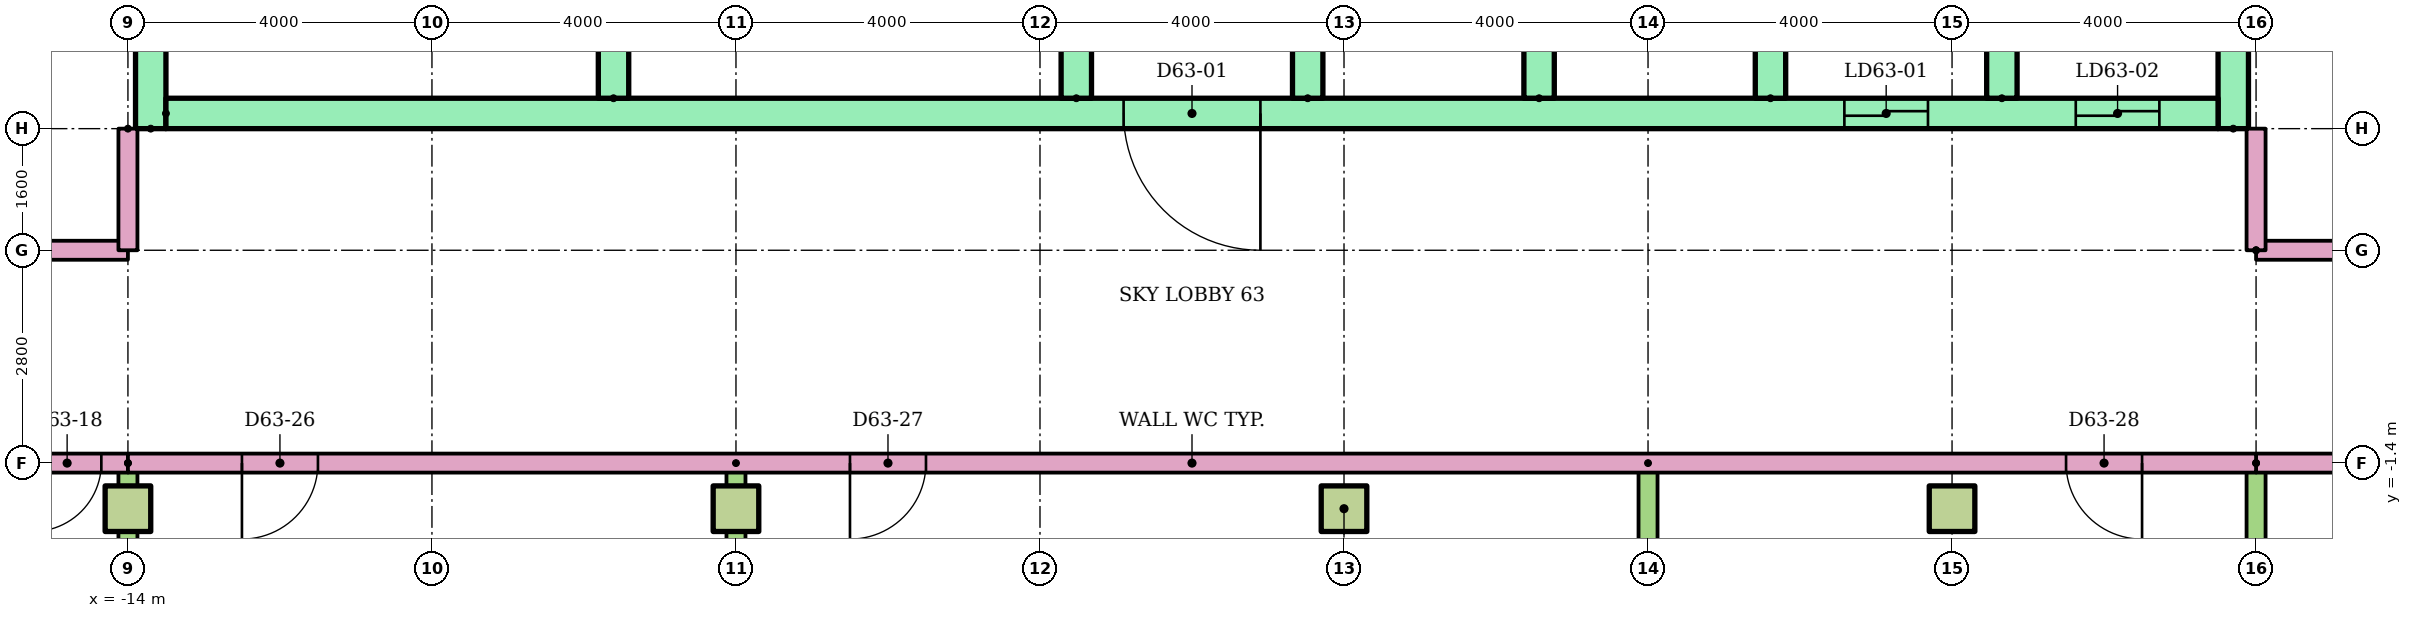
"""IFC4 building model, lengths in metres.
Left out: names, types, materials, properties, quantities, classifications, styles, units other than length and angle.
Written with IfcOpenShell. Run it as: python <this file> out.ifc"""

import sys

from ifc_helpers import new_model, si_unit, direction, frame, frame_2d, origin, origin_2d, place, context, subcontext, project, spatial, rectangle, extrude, element, fill, save


model = new_model("IFC4")
c1 = context("Model", 3, precision=1e-05, world=origin(), true_north=direction((0.0, 1.0)))
c2 = subcontext(c1, "Body", "Model", "MODEL_VIEW")
j1 = project(units=[si_unit("LENGTHUNIT", "METRE"), si_unit("PLANEANGLEUNIT", "RADIAN")], contexts=[c1])
p1 = place(None, origin())
s1 = spatial("IfcSite", under=j1, at=p1, CompositionType="ELEMENT")
p2 = place(p1, origin())
s2 = spatial("IfcBuilding", under=s1, at=p2, CompositionType="ELEMENT")
p3 = place(p2, frame((0.0, 0.0, 239.6)))
s3 = spatial("IfcBuildingStorey", under=s2, at=p3, CompositionType="ELEMENT", Elevation=239.6)
for number, where in (
    (1, (-14.0, -2.0, 0.0)),
    (2, (-6.0, -2.0, 0.0)),
    (3, (2.0, -2.0, 0.0)),
    (4, (10.0, -2.0, 0.0)),
):
    element("IfcColumn", number, at=place(p3, frame(where)), inside=s3, PredefinedType="COLUMN", context=c2, shape_type="SweptSolid", body=[
        extrude(rectangle(XDim=0.6, YDim=0.6, at=origin_2d()), origin(), (0.0, 0.0, 1.0), 8.8),
    ])
for number, where, z_axis, x_axis in (
    (5, (-13.7, 3.0, 0.0), (0.0, 0.0, 1.0), (0.0, 1.0, 0.0)),
    (6, (13.7, 3.0, 0.0), (0.0, 0.0, 1.0), (0.0, 1.0, 0.0)),
):
    element("IfcWall", number, at=place(p3, frame(where, z_axis=z_axis, x_axis=x_axis)), inside=s3, PredefinedType="SHEAR", context=c2, shape_type="SweptSolid", body=[
        extrude(rectangle(XDim=17.0, YDim=0.4, at=frame_2d((8.5, 0.0))), origin(), (0.0, 0.0, 1.0), 8.8),
    ])
p4 = place(p3, frame((-13.5, 3.2, 0.0)))
e7 = element("IfcWall", 7, at=p4, inside=s3, PredefinedType="SHEAR", context=c2, shape_type="SweptSolid", body=[
    extrude(rectangle(XDim=27.0, YDim=0.4, at=frame_2d((13.5, 0.0))), origin(), (0.0, 0.0, 1.0), 8.8),
])
p5 = place(p4, frame((22.083, 0.0, 0.0)))
e8 = element("IfcOpeningElement", 8, at=p5, cuts=e7, PredefinedType="OPENING", context=c2, shape_type="SweptSolid", body=[
    extrude(rectangle(XDim=1.1, YDim=2.1, at=frame_2d((0.55, 1.05))), frame((0.0, 0.21, 0.0), z_axis=(0.0, -1.0, 0.0), x_axis=(1.0, 0.0, 0.0)), (0.0, 0.0, 1.0), 0.42),
])
p6 = place(p4, frame((25.128, 0.0, 0.0)))
e9 = element("IfcOpeningElement", 9, at=p6, cuts=e7, PredefinedType="OPENING", context=c2, shape_type="SweptSolid", body=[
    extrude(rectangle(XDim=1.1, YDim=2.1, at=frame_2d((0.55, 1.05))), frame((0.0, 0.21, 0.0), z_axis=(0.0, -1.0, 0.0), x_axis=(1.0, 0.0, 0.0)), (0.0, 0.0, 1.0), 0.42),
])
p7 = place(p4, frame((12.6, 0.0, 0.0)))
e10 = element("IfcOpeningElement", 10, at=p7, cuts=e7, PredefinedType="OPENING", context=c2, shape_type="SweptSolid", body=[
    extrude(rectangle(XDim=1.8, YDim=2.1, at=frame_2d((0.9, 1.05))), frame((0.0, 0.21, 0.0), z_axis=(0.0, -1.0, 0.0), x_axis=(1.0, 0.0, 0.0)), (0.0, 0.0, 1.0), 0.42),
])
for number, where, z_axis, x_axis in (
    (11, (-7.611, 3.4, 0.0), (0.0, 0.0, 1.0), (0.0, 1.0, 0.0)),
    (12, (-1.522, 3.4, 0.0), (0.0, 0.0, 1.0), (0.0, 1.0, 0.0)),
    (13, (1.522, 3.4, 0.0), (0.0, 0.0, 1.0), (0.0, 1.0, 0.0)),
    (14, (4.567, 3.4, 0.0), (0.0, 0.0, 1.0), (0.0, 1.0, 0.0)),
    (15, (7.611, 3.4, 0.0), (0.0, 0.0, 1.0), (0.0, 1.0, 0.0)),
    (16, (10.656, 3.4, 0.0), (0.0, 0.0, 1.0), (0.0, 1.0, 0.0)),
):
    element("IfcWall", number, at=place(p3, frame(where, z_axis=z_axis, x_axis=x_axis)), inside=s3, PredefinedType="SHEAR", context=c2, shape_type="SweptSolid", body=[
        extrude(rectangle(XDim=3.0, YDim=0.4, at=frame_2d((1.5, 0.0))), origin(), (0.0, 0.0, 1.0), 8.8),
    ])
p8 = place(p3, frame((-14.0, -1.4, 0.0), z_axis=(0.0, 0.0, 1.0), x_axis=(-1.0, 0.0, 0.0)))
e17 = element("IfcWall", 17, at=p8, inside=s3, PredefinedType="PARTITIONING", context=c2, shape_type="SweptSolid", body=[
    extrude(rectangle(XDim=14.93, YDim=0.25, at=frame_2d((7.465, 0.0))), origin(), (0.0, 0.0, 1.0), 8.8),
])
p9 = place(p8, frame((0.35, 0.0, 0.0)))
e18 = element("IfcOpeningElement", 18, at=p9, cuts=e17, PredefinedType="OPENING", context=c2, shape_type="SweptSolid", body=[
    extrude(rectangle(XDim=0.9, YDim=2.1, at=frame_2d((0.45, 1.05))), frame((0.0, 0.135, 0.0), z_axis=(0.0, -1.0, 0.0), x_axis=(1.0, 0.0, 0.0)), (0.0, 0.0, 1.0), 0.27),
])
p10 = place(p8, frame((5.5, 0.0, 0.0)))
e19 = element("IfcOpeningElement", 19, at=p10, cuts=e17, PredefinedType="OPENING", context=c2, shape_type="SweptSolid", body=[
    extrude(rectangle(XDim=1.0, YDim=2.1, at=frame_2d((0.5, 1.05))), frame((0.0, 0.135, 0.0), z_axis=(0.0, -1.0, 0.0), x_axis=(1.0, 0.0, 0.0)), (0.0, 0.0, 1.0), 0.27),
])
p11 = place(p3, frame((-14.0, -1.4, 0.0), z_axis=(0.0, 0.0, 1.0), x_axis=(0.0, -1.0, 0.0)))
e20 = element("IfcWall", 20, at=p11, inside=s3, PredefinedType="PARTITIONING", context=c2, shape_type="SweptSolid", body=[
    extrude(rectangle(XDim=15.121, YDim=0.25, at=frame_2d((7.561, 0.0))), origin(), (0.0, 0.0, 1.0), 8.8),
])
p12 = place(p3, frame((-28.93, 1.4, 0.0)))
e21 = element("IfcWall", 21, at=p12, inside=s3, PredefinedType="PARTITIONING", context=c2, shape_type="SweptSolid", body=[
    extrude(rectangle(XDim=14.93, YDim=0.25, at=frame_2d((7.465, 0.0))), origin(), (0.0, 0.0, 1.0), 8.8),
])
p13 = place(p12, frame((12.43, 0.0, 0.0)))
e22 = element("IfcOpeningElement", 22, at=p13, cuts=e21, PredefinedType="OPENING", context=c2, shape_type="SweptSolid", body=[
    extrude(rectangle(XDim=1.0, YDim=2.1, at=frame_2d((0.5, 1.05))), frame((0.0, 0.135, 0.0), z_axis=(0.0, -1.0, 0.0), x_axis=(1.0, 0.0, 0.0)), (0.0, 0.0, 1.0), 0.27),
])
p14 = place(p12, frame((4.43, 0.0, 0.0)))
e23 = element("IfcOpeningElement", 23, at=p14, cuts=e21, PredefinedType="OPENING", context=c2, shape_type="SweptSolid", body=[
    extrude(rectangle(XDim=1.0, YDim=2.1, at=frame_2d((0.5, 1.05))), frame((0.0, 0.135, 0.0), z_axis=(0.0, -1.0, 0.0), x_axis=(1.0, 0.0, 0.0)), (0.0, 0.0, 1.0), 0.27),
])
p15 = place(p3, frame((28.93, -1.4, 0.0), z_axis=(0.0, 0.0, 1.0), x_axis=(-1.0, 0.0, 0.0)))
e24 = element("IfcWall", 24, at=p15, inside=s3, PredefinedType="PARTITIONING", context=c2, shape_type="SweptSolid", body=[
    extrude(rectangle(XDim=14.93, YDim=0.25, at=frame_2d((7.465, 0.0))), origin(), (0.0, 0.0, 1.0), 8.8),
])
p16 = place(p15, frame((12.43, 0.0, 0.0)))
e25 = element("IfcOpeningElement", 25, at=p16, cuts=e24, PredefinedType="OPENING", context=c2, shape_type="SweptSolid", body=[
    extrude(rectangle(XDim=1.0, YDim=2.1, at=frame_2d((0.5, 1.05))), frame((0.0, 0.135, 0.0), z_axis=(0.0, -1.0, 0.0), x_axis=(1.0, 0.0, 0.0)), (0.0, 0.0, 1.0), 0.27),
])
p17 = place(p15, frame((4.43, 0.0, 0.0)))
e26 = element("IfcOpeningElement", 26, at=p17, cuts=e24, PredefinedType="OPENING", context=c2, shape_type="SweptSolid", body=[
    extrude(rectangle(XDim=1.0, YDim=2.1, at=frame_2d((0.5, 1.05))), frame((0.0, 0.135, 0.0), z_axis=(0.0, -1.0, 0.0), x_axis=(1.0, 0.0, 0.0)), (0.0, 0.0, 1.0), 0.27),
])
p18 = place(p3, frame((14.0, -1.4, 0.0), z_axis=(0.0, 0.0, 1.0), x_axis=(0.0, -1.0, 0.0)))
e27 = element("IfcWall", 27, at=p18, inside=s3, PredefinedType="PARTITIONING", context=c2, shape_type="SweptSolid", body=[
    extrude(rectangle(XDim=15.121, YDim=0.25, at=frame_2d((7.561, 0.0))), origin(), (0.0, 0.0, 1.0), 8.8),
])
p19 = place(p3, frame((14.0, 1.4, 0.0)))
e28 = element("IfcWall", 28, at=p19, inside=s3, PredefinedType="PARTITIONING", context=c2, shape_type="SweptSolid", body=[
    extrude(rectangle(XDim=14.93, YDim=0.25, at=frame_2d((7.465, 0.0))), origin(), (0.0, 0.0, 1.0), 8.8),
])
p20 = place(p19, frame((1.5, 0.0, 0.0)))
e29 = element("IfcOpeningElement", 29, at=p20, cuts=e28, PredefinedType="OPENING", context=c2, shape_type="SweptSolid", body=[
    extrude(rectangle(XDim=1.0, YDim=2.1, at=frame_2d((0.5, 1.05))), frame((0.0, 0.135, 0.0), z_axis=(0.0, -1.0, 0.0), x_axis=(1.0, 0.0, 0.0)), (0.0, 0.0, 1.0), 0.27),
])
p21 = place(p19, frame((9.5, 0.0, 0.0)))
e30 = element("IfcOpeningElement", 30, at=p21, cuts=e28, PredefinedType="OPENING", context=c2, shape_type="SweptSolid", body=[
    extrude(rectangle(XDim=1.0, YDim=2.1, at=frame_2d((0.5, 1.05))), frame((0.0, 0.135, 0.0), z_axis=(0.0, -1.0, 0.0), x_axis=(1.0, 0.0, 0.0)), (0.0, 0.0, 1.0), 0.27),
])
for number, where, z_axis, x_axis in (
    (31, (-6.0, -1.4, 0.0), (0.0, 0.0, 1.0), (0.0, -1.0, 0.0)),
    (32, (6.0, -1.4, 0.0), (0.0, 0.0, 1.0), (0.0, -1.0, 0.0)),
):
    element("IfcWall", number, at=place(p3, frame(where, z_axis=z_axis, x_axis=x_axis)), inside=s3, PredefinedType="PARTITIONING", context=c2, shape_type="SweptSolid", body=[
        extrude(rectangle(XDim=15.121, YDim=0.25, at=frame_2d((7.561, 0.0))), origin(), (0.0, 0.0, 1.0), 8.8),
    ])
p22 = place(p3, frame((14.0, -1.4, 0.0), z_axis=(0.0, 0.0, 1.0), x_axis=(-1.0, 0.0, 0.0)))
e33 = element("IfcWall", 33, at=p22, inside=s3, PredefinedType="PARTITIONING", context=c2, shape_type="SweptSolid", body=[
    extrude(rectangle(XDim=28.0, YDim=0.25, at=frame_2d((14.0, 0.0))), origin(), (0.0, 0.0, 1.0), 8.8),
])
p23 = place(p22, frame((25.5, 0.0, 0.0)))
e34 = element("IfcOpeningElement", 34, at=p23, cuts=e33, PredefinedType="OPENING", context=c2, shape_type="SweptSolid", body=[
    extrude(rectangle(XDim=1.0, YDim=2.1, at=frame_2d((0.5, 1.05))), frame((0.0, 0.135, 0.0), z_axis=(0.0, -1.0, 0.0), x_axis=(1.0, 0.0, 0.0)), (0.0, 0.0, 1.0), 0.27),
])
p24 = place(p22, frame((17.5, 0.0, 0.0)))
e35 = element("IfcOpeningElement", 35, at=p24, cuts=e33, PredefinedType="OPENING", context=c2, shape_type="SweptSolid", body=[
    extrude(rectangle(XDim=1.0, YDim=2.1, at=frame_2d((0.5, 1.05))), frame((0.0, 0.135, 0.0), z_axis=(0.0, -1.0, 0.0), x_axis=(1.0, 0.0, 0.0)), (0.0, 0.0, 1.0), 0.27),
])
p25 = place(p22, frame((1.5, 0.0, 0.0)))
e36 = element("IfcOpeningElement", 36, at=p25, cuts=e33, PredefinedType="OPENING", context=c2, shape_type="SweptSolid", body=[
    extrude(rectangle(XDim=1.0, YDim=2.1, at=frame_2d((0.5, 1.05))), frame((0.0, 0.135, 0.0), z_axis=(0.0, -1.0, 0.0), x_axis=(1.0, 0.0, 0.0)), (0.0, 0.0, 1.0), 0.27),
])
for number, where, z_axis, x_axis in (
    (37, (-14.0, 3.0, 0.0), (0.0, 0.0, 1.0), (0.0, -1.0, 0.0)),
    (38, (14.0, 1.4, 0.0), (0.0, 0.0, 1.0), (0.0, 1.0, 0.0)),
):
    element("IfcWall", number, at=place(p3, frame(where, z_axis=z_axis, x_axis=x_axis)), inside=s3, PredefinedType="PARTITIONING", context=c2, shape_type="SweptSolid", body=[
        extrude(rectangle(XDim=1.6, YDim=0.25, at=frame_2d((0.8, 0.0))), origin(), (0.0, 0.0, 1.0), 8.8),
    ])
p26 = place(p5, origin())
e39 = element("IfcDoor", 39, at=p26, inside=s3, OperationType="SLIDING_TO_LEFT", PredefinedType="DOOR", context=c2, shape_type="SweptSolid", body=[
    extrude(rectangle(XDim=1.1, YDim=2.1, at=frame_2d((0.55, 1.05))), frame((0.0, 0.025, 0.0), z_axis=(0.0, -1.0, 0.0), x_axis=(1.0, 0.0, 0.0)), (0.0, 0.0, 1.0), 0.05),
])
fill(e8, e39)
p27 = place(p6, origin())
e40 = element("IfcDoor", 40, at=p27, inside=s3, OperationType="SLIDING_TO_LEFT", PredefinedType="DOOR", context=c2, shape_type="SweptSolid", body=[
    extrude(rectangle(XDim=1.1, YDim=2.1, at=frame_2d((0.55, 1.05))), frame((0.0, 0.025, 0.0), z_axis=(0.0, -1.0, 0.0), x_axis=(1.0, 0.0, 0.0)), (0.0, 0.0, 1.0), 0.05),
])
fill(e9, e40)
p28 = place(p7, frame((1.8, 0.0, 0.0), z_axis=(0.0, 0.0, 1.0), x_axis=(-1.0, 0.0, 0.0)))
e41 = element("IfcDoor", 41, at=p28, inside=s3, OperationType="DOUBLE_DOOR_SINGLE_SWING", PredefinedType="DOOR", context=c2, shape_type="SweptSolid", body=[
    extrude(rectangle(XDim=1.8, YDim=2.1, at=frame_2d((0.9, 1.05))), frame((0.0, 0.025, 0.0), z_axis=(0.0, -1.0, 0.0), x_axis=(1.0, 0.0, 0.0)), (0.0, 0.0, 1.0), 0.05),
])
fill(e10, e41)
p29 = place(p9, origin())
e42 = element("IfcDoor", 42, at=p29, inside=s3, OperationType="SINGLE_SWING_RIGHT", PredefinedType="DOOR", context=c2, shape_type="SweptSolid", body=[
    extrude(rectangle(XDim=0.9, YDim=2.1, at=frame_2d((0.45, 1.05))), frame((0.0, 0.025, 0.0), z_axis=(0.0, -1.0, 0.0), x_axis=(1.0, 0.0, 0.0)), (0.0, 0.0, 1.0), 0.05),
])
fill(e18, e42)
p30 = place(p23, origin())
e43 = element("IfcDoor", 43, at=p30, inside=s3, OperationType="SINGLE_SWING_RIGHT", PredefinedType="DOOR", context=c2, shape_type="SweptSolid", body=[
    extrude(rectangle(XDim=1.0, YDim=2.1, at=frame_2d((0.5, 1.05))), frame((0.0, 0.025, 0.0), z_axis=(0.0, -1.0, 0.0), x_axis=(1.0, 0.0, 0.0)), (0.0, 0.0, 1.0), 0.05),
])
fill(e34, e43)
p31 = place(p24, origin())
e44 = element("IfcDoor", 44, at=p31, inside=s3, OperationType="SINGLE_SWING_RIGHT", PredefinedType="DOOR", context=c2, shape_type="SweptSolid", body=[
    extrude(rectangle(XDim=1.0, YDim=2.1, at=frame_2d((0.5, 1.05))), frame((0.0, 0.025, 0.0), z_axis=(0.0, -1.0, 0.0), x_axis=(1.0, 0.0, 0.0)), (0.0, 0.0, 1.0), 0.05),
])
fill(e35, e44)
p32 = place(p25, origin())
e45 = element("IfcDoor", 45, at=p32, inside=s3, OperationType="SINGLE_SWING_LEFT", PredefinedType="DOOR", context=c2, shape_type="SweptSolid", body=[
    extrude(rectangle(XDim=1.0, YDim=2.1, at=frame_2d((0.5, 1.05))), frame((0.0, 0.025, 0.0), z_axis=(0.0, -1.0, 0.0), x_axis=(1.0, 0.0, 0.0)), (0.0, 0.0, 1.0), 0.05),
])
fill(e36, e45)
save(model, sys.argv[1])
